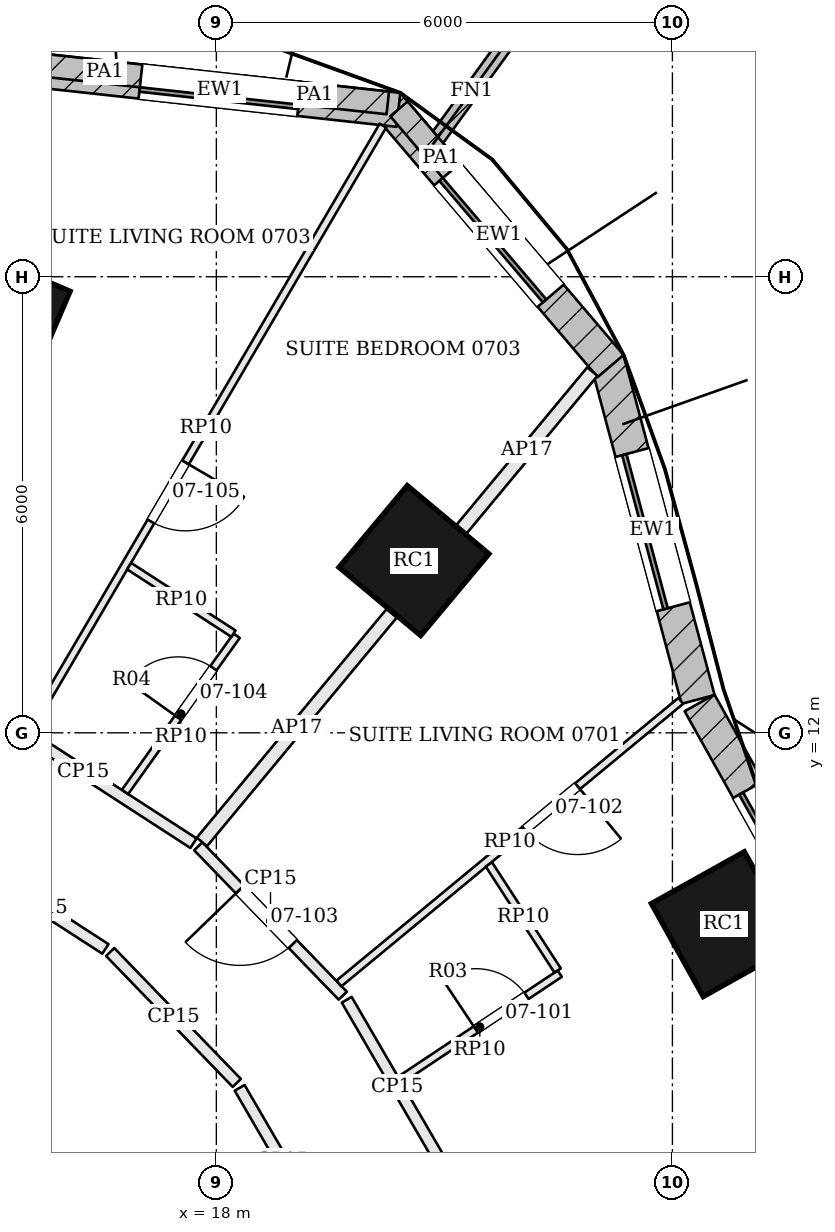
"""IFC4 building model, lengths in metres.
Left out: names, types, materials, properties, quantities, classifications, styles, units other than length and angle.
Written with IfcOpenShell. Run it as: python <this file> out.ifc"""

import sys

from ifc_helpers import new_model, si_unit, direction, frame, frame_2d, origin, origin_2d, place, context, subcontext, project, spatial, rectangle, extrude, element, fill, save


model = new_model("IFC4")
c1 = context("Model", 3, precision=1e-05, world=origin(), true_north=direction((0.0, 1.0)))
c2 = subcontext(c1, "Body", "Model", "MODEL_VIEW")
j1 = project(units=[si_unit("LENGTHUNIT", "METRE"), si_unit("PLANEANGLEUNIT", "RADIAN")], contexts=[c1])
p1 = place(None, origin())
s1 = spatial("IfcSite", under=j1, at=p1, CompositionType="ELEMENT")
p2 = place(p1, origin())
s2 = spatial("IfcBuilding", under=s1, at=p2, CompositionType="ELEMENT")
p3 = place(p2, frame((0.0, 0.0, 41.1)))
s3 = spatial("IfcBuildingStorey", under=s2, at=p3, CompositionType="ELEMENT", Elevation=41.1)
for number, where, z_axis, x_axis in (
    (1, (24.676, 9.483, 0.0), (0.0, 0.0, 1.0), (-0.487, 0.873, 0.0)),
    (2, (20.6, 14.266, 0.0), (0.0, 0.0, 1.0), (-0.767, 0.641, 0.0)),
    (3, (15.157, 17.441, 0.0), (0.0, 0.0, 1.0), (-0.919, 0.394, 0.0)),
):
    element("IfcColumn", number, at=place(p3, frame(where, z_axis=z_axis, x_axis=x_axis)), inside=s3, PredefinedType="COLUMN", context=c2, shape_type="SweptSolid", body=[
        extrude(rectangle(XDim=1.4, YDim=1.4, at=origin_2d()), origin(), (0.0, 0.0, 1.0), 3.6),
    ])
p4 = place(p3, frame((26.514, 8.541, 0.0), z_axis=(0.0, 0.0, 1.0), x_axis=(-0.488504028898, 0.87256163894, 0.0)))
e4 = element("IfcWall", 4, at=p4, inside=s3, PredefinedType="SOLIDWALL", context=c2, shape_type="SweptSolid", body=[
    extrude(rectangle(XDim=4.416, YDim=0.45, at=frame_2d((2.208, 0.0))), origin(), (0.0, 0.0, 1.0), 3.4),
])
p5 = place(p4, frame((1.308, 0.0, 0.9)))
e5 = element("IfcOpeningElement", 5, at=p5, cuts=e4, PredefinedType="OPENING", context=c2, shape_type="SweptSolid", body=[
    extrude(rectangle(XDim=1.8, YDim=2.0, at=frame_2d((0.9, 1.0))), frame((0.0, 0.235, 0.0), z_axis=(0.0, -1.0, 0.0), x_axis=(1.0, 0.0, 0.0)), (0.0, 0.0, 1.0), 0.47),
])
p6 = place(p3, frame((24.337, 12.439, 0.0), z_axis=(0.0, 0.0, 1.0), x_axis=(-0.258441377569, 0.966026942875, 0.0)))
e6 = element("IfcWall", 6, at=p6, inside=s3, PredefinedType="SOLIDWALL", context=c2, shape_type="SweptSolid", body=[
    extrude(rectangle(XDim=4.624, YDim=0.45, at=frame_2d((2.312, 0.0))), origin(), (0.0, 0.0, 1.0), 3.4),
])
p7 = place(p6, frame((1.262, 0.0, 0.9)))
e7 = element("IfcOpeningElement", 7, at=p7, cuts=e6, PredefinedType="OPENING", context=c2, shape_type="SweptSolid", body=[
    extrude(rectangle(XDim=2.1, YDim=2.0, at=frame_2d((1.05, 1.0))), frame((0.0, 0.235, 0.0), z_axis=(0.0, -1.0, 0.0), x_axis=(1.0, 0.0, 0.0)), (0.0, 0.0, 1.0), 0.47),
])
p8 = place(p3, frame((23.187, 16.825, 0.0), z_axis=(0.0, 0.0, 1.0), x_axis=(-0.648462985992, 0.761246186065, 0.0)))
e8 = element("IfcWall", 8, at=p8, inside=s3, PredefinedType="SOLIDWALL", context=c2, shape_type="SweptSolid", body=[
    extrude(rectangle(XDim=4.531, YDim=0.45, at=frame_2d((2.265, 0.0))), origin(), (0.0, 0.0, 1.0), 3.4),
])
p9 = place(p8, frame((1.215, 0.0, 0.9)))
e9 = element("IfcOpeningElement", 9, at=p9, cuts=e8, PredefinedType="OPENING", context=c2, shape_type="SweptSolid", body=[
    extrude(rectangle(XDim=2.1, YDim=2.0, at=frame_2d((1.05, 1.0))), frame((0.0, 0.235, 0.0), z_axis=(0.0, -1.0, 0.0), x_axis=(1.0, 0.0, 0.0)), (0.0, 0.0, 1.0), 0.47),
])
p10 = place(p3, frame((20.396, 20.196, 0.0), z_axis=(0.0, 0.0, 1.0), x_axis=(-0.994063142291, 0.108804729393, 0.0)))
e10 = element("IfcWall", 10, at=p10, inside=s3, PredefinedType="SOLIDWALL", context=c2, shape_type="SweptSolid", body=[
    extrude(rectangle(XDim=4.728, YDim=0.45, at=frame_2d((2.364, 0.0))), origin(), (0.0, 0.0, 1.0), 3.4),
])
p11 = place(p10, frame((1.314, 0.0, 0.9)))
e11 = element("IfcOpeningElement", 11, at=p11, cuts=e10, PredefinedType="OPENING", context=c2, shape_type="SweptSolid", body=[
    extrude(rectangle(XDim=2.1, YDim=2.0, at=frame_2d((1.05, 1.0))), frame((0.0, 0.235, 0.0), z_axis=(0.0, -1.0, 0.0), x_axis=(1.0, 0.0, 0.0)), (0.0, 0.0, 1.0), 0.47),
])
p12 = place(p3, frame((20.846, 19.739, 0.0), z_axis=(0.0, 0.0, 1.0), x_axis=(0.587607490034, 0.809146116382, 0.0)))
e12 = element("IfcWall", 12, at=p12, inside=s3, PredefinedType="SOLIDWALL", context=c2, shape_type="SweptSolid", body=[
    extrude(rectangle(XDim=1.75, YDim=0.2, at=frame_2d((0.875, 0.0))), origin(), (0.0, 0.0, 1.0), 3.4),
])
p13 = place(p3, frame((21.513, 18.906, 3.6), z_axis=(0.0, 0.0, 1.0), x_axis=(-0.648451151452, 0.761256267088, 0.0)))
e13 = element("IfcWall", 13, at=p13, inside=s3, PredefinedType="PARAPET", context=c2, shape_type="SweptSolid", body=[
    extrude(rectangle(XDim=1.712, YDim=0.3, at=frame_2d((0.856, 0.0))), origin(), (0.0, 0.0, 1.0), 1.1),
])
p14 = place(p3, frame((20.255, 20.287, 3.6), z_axis=(0.0, 0.0, 1.0), x_axis=(-0.994062724773, 0.108808543863, 0.0)))
e14 = element("IfcWall", 14, at=p14, inside=s3, PredefinedType="PARAPET", context=c2, shape_type="SweptSolid", body=[
    extrude(rectangle(XDim=1.932, YDim=0.3, at=frame_2d((0.966, 0.0))), origin(), (0.0, 0.0, 1.0), 1.1),
])
p15 = place(p3, frame((17.772, 20.559, 3.6), z_axis=(0.0, 0.0, 1.0), x_axis=(-0.994063072833, 0.108805363973, 0.0)))
e15 = element("IfcWall", 15, at=p15, inside=s3, PredefinedType="PARAPET", context=c2, shape_type="SweptSolid", body=[
    extrude(rectangle(XDim=2.489, YDim=0.3, at=frame_2d((1.244, 0.0))), origin(), (0.0, 0.0, 1.0), 1.1),
])
p16 = place(p3, frame((21.043, 6.202, 0.0), z_axis=(0.0, 0.0, 1.0), x_axis=(-0.502371650135, 0.864651794158, 0.0)))
e16 = element("IfcWall", 16, at=p16, inside=s3, PredefinedType="PARTITIONING", context=c2, shape_type="SweptSolid", body=[
    extrude(rectangle(XDim=2.644, YDim=0.15, at=frame_2d((1.322, 0.0))), origin(), (0.0, 0.0, 1.0), 2.68),
])
p17 = place(p3, frame((19.663, 8.542, 0.0), z_axis=(0.0, 0.0, 1.0), x_axis=(-0.695220577526, 0.718796458383, 0.0)))
e17 = element("IfcWall", 17, at=p17, inside=s3, PredefinedType="PARTITIONING", context=c2, shape_type="SweptSolid", body=[
    extrude(rectangle(XDim=2.734, YDim=0.15, at=frame_2d((1.367, 0.0))), origin(), (0.0, 0.0, 1.0), 2.68),
])
p18 = place(p17, frame((0.945, 0.0, 0.0)))
e18 = element("IfcOpeningElement", 18, at=p18, cuts=e17, PredefinedType="OPENING", context=c2, shape_type="SweptSolid", body=[
    extrude(rectangle(XDim=1.0, YDim=2.1, at=frame_2d((0.5, 1.05))), frame((0.0, 0.085, 0.0), z_axis=(0.0, -1.0, 0.0), x_axis=(1.0, 0.0, 0.0)), (0.0, 0.0, 1.0), 0.17),
])
p19 = place(p3, frame((22.947, 16.752, 0.0), z_axis=(0.0, 0.0, 1.0), x_axis=(-0.638756388383, -0.769409043552, 0.0)))
e19 = element("IfcWall", 19, at=p19, inside=s3, PredefinedType="PARTITIONING", context=c2, shape_type="SweptSolid", body=[
    extrude(rectangle(XDim=2.693, YDim=0.175, at=frame_2d((1.346, 0.0))), origin(), (0.0, 0.0, 1.0), 2.68),
])
p20 = place(p3, frame((20.307, 13.573, 0.0), z_axis=(0.0, 0.0, 1.0), x_axis=(-0.638751887509, -0.769412780114, 0.0)))
e20 = element("IfcWall", 20, at=p20, inside=s3, PredefinedType="PARTITIONING", context=c2, shape_type="SweptSolid", body=[
    extrude(rectangle(XDim=3.909, YDim=0.175, at=frame_2d((1.955, 0.0))), origin(), (0.0, 0.0, 1.0), 2.68),
])
p21 = place(p3, frame((17.699, 10.548, 0.0), z_axis=(0.0, 0.0, 1.0), x_axis=(-0.839188825453, 0.54384015596, 0.0)))
e21 = element("IfcWall", 21, at=p21, inside=s3, PredefinedType="PARTITIONING", context=c2, shape_type="SweptSolid", body=[
    extrude(rectangle(XDim=3.454, YDim=0.15, at=frame_2d((1.727, 0.0))), origin(), (0.0, 0.0, 1.0), 2.68),
])
p22 = place(p3, frame((16.604, 9.116, 0.0), z_axis=(0.0, 0.0, 1.0), x_axis=(0.695185405932, -0.718830474716, 0.0)))
e22 = element("IfcWall", 22, at=p22, inside=s3, PredefinedType="PARTITIONING", context=c2, shape_type="SweptSolid", body=[
    extrude(rectangle(XDim=2.396, YDim=0.15, at=frame_2d((1.198, 0.0))), origin(), (0.0, 0.0, 1.0), 2.68),
])
p23 = place(p3, frame((18.306, 7.329, 0.0), z_axis=(0.0, 0.0, 1.0), x_axis=(0.502425081691, -0.864620747662, 0.0)))
e23 = element("IfcWall", 23, at=p23, inside=s3, PredefinedType="PARTITIONING", context=c2, shape_type="SweptSolid", body=[
    extrude(rectangle(XDim=2.237, YDim=0.15, at=frame_2d((1.119, 0.0))), origin(), (0.0, 0.0, 1.0), 2.68),
])
p24 = place(p3, frame((14.863, 10.242, 0.0), z_axis=(0.0, 0.0, 1.0), x_axis=(0.839530811724, -0.543312079901, 0.0)))
e24 = element("IfcWall", 24, at=p24, inside=s3, PredefinedType="PARTITIONING", context=c2, shape_type="SweptSolid", body=[
    extrude(rectangle(XDim=1.998, YDim=0.15, at=frame_2d((0.999, 0.0))), origin(), (0.0, 0.0, 1.0), 2.68),
])
p25 = place(p3, frame((24.11, 12.42, 0.0), z_axis=(0.0, 0.0, 1.0), x_axis=(-0.770718759666, -0.637175480931, 0.0)))
e25 = element("IfcWall", 25, at=p25, inside=s3, PredefinedType="PARTITIONING", context=c2, shape_type="SweptSolid", body=[
    extrude(rectangle(XDim=5.835, YDim=0.1, at=frame_2d((2.918, 0.0))), origin(), (0.0, 0.0, 1.0), 2.68),
])
p26 = place(p25, frame((1.761, 0.0, 0.0)))
e26 = element("IfcOpeningElement", 26, at=p26, cuts=e25, PredefinedType="OPENING", context=c2, shape_type="SweptSolid", body=[
    extrude(rectangle(XDim=0.9, YDim=2.4, at=frame_2d((0.45, 1.2))), frame((0.0, 0.06, 0.0), z_axis=(0.0, -1.0, 0.0), x_axis=(1.0, 0.0, 0.0)), (0.0, 0.0, 1.0), 0.12),
])
p27 = place(p3, frame((20.415, 7.433, 0.0), z_axis=(0.0, 0.0, 1.0), x_axis=(0.832615138826, 0.553851993404, 0.0)))
e27 = element("IfcWall", 27, at=p27, inside=s3, PredefinedType="PARTITIONING", context=c2, shape_type="SweptSolid", body=[
    extrude(rectangle(XDim=2.525, YDim=0.1, at=frame_2d((1.262, 0.0))), origin(), (0.0, 0.0, 1.0), 2.68),
])
p28 = place(p27, frame((1.2, 0.0, 0.0)))
e28 = element("IfcOpeningElement", 28, at=p28, cuts=e27, PredefinedType="OPENING", context=c2, shape_type="SweptSolid", body=[
    extrude(rectangle(XDim=0.8, YDim=2.1, at=frame_2d((0.4, 1.05))), frame((0.0, 0.06, 0.0), z_axis=(0.0, -1.0, 0.0), x_axis=(1.0, 0.0, 0.0)), (0.0, 0.0, 1.0), 0.12),
])
p29 = place(p3, frame((22.49, 8.873, 0.0), z_axis=(0.0, 0.0, 1.0), x_axis=(-0.543847599443, 0.839184001623, 0.0)))
e29 = element("IfcWall", 29, at=p29, inside=s3, PredefinedType="PARTITIONING", context=c2, shape_type="SweptSolid", body=[
    extrude(rectangle(XDim=1.663, YDim=0.1, at=frame_2d((0.832, 0.0))), origin(), (0.0, 0.0, 1.0), 2.68),
])
p30 = place(p3, frame((20.191, 19.988, 0.0), z_axis=(0.0, 0.0, 1.0), x_axis=(-0.505620182585, -0.862756182802, 0.0)))
e30 = element("IfcWall", 30, at=p30, inside=s3, PredefinedType="PARTITIONING", context=c2, shape_type="SweptSolid", body=[
    extrude(rectangle(XDim=9.211, YDim=0.1, at=frame_2d((4.605, 0.0))), origin(), (0.0, 0.0, 1.0), 2.68),
])
p31 = place(p30, frame((5.136, 0.0, 0.0)))
e31 = element("IfcOpeningElement", 31, at=p31, cuts=e30, PredefinedType="OPENING", context=c2, shape_type="SweptSolid", body=[
    extrude(rectangle(XDim=0.9, YDim=2.4, at=frame_2d((0.45, 1.2))), frame((0.0, 0.06, 0.0), z_axis=(0.0, -1.0, 0.0), x_axis=(1.0, 0.0, 0.0)), (0.0, 0.0, 1.0), 0.12),
])
p32 = place(p3, frame((16.799, 11.223, 0.0), z_axis=(0.0, 0.0, 1.0), x_axis=(0.581494263037, 0.81355050369, 0.0)))
e32 = element("IfcWall", 32, at=p32, inside=s3, PredefinedType="PARTITIONING", context=c2, shape_type="SweptSolid", body=[
    extrude(rectangle(XDim=2.525, YDim=0.1, at=frame_2d((1.262, 0.0))), origin(), (0.0, 0.0, 1.0), 2.68),
])
p33 = place(p32, frame((1.2, 0.0, 0.0)))
e33 = element("IfcOpeningElement", 33, at=p33, cuts=e32, PredefinedType="OPENING", context=c2, shape_type="SweptSolid", body=[
    extrude(rectangle(XDim=0.8, YDim=2.1, at=frame_2d((0.4, 1.05))), frame((0.0, 0.06, 0.0), z_axis=(0.0, -1.0, 0.0), x_axis=(1.0, 0.0, 0.0)), (0.0, 0.0, 1.0), 0.12),
])
p34 = place(p3, frame((18.225, 13.304, 0.0), z_axis=(0.0, 0.0, 1.0), x_axis=(-0.839486017112, 0.543381290692, 0.0)))
e34 = element("IfcWall", 34, at=p34, inside=s3, PredefinedType="PARTITIONING", context=c2, shape_type="SweptSolid", body=[
    extrude(rectangle(XDim=1.635, YDim=0.1, at=frame_2d((0.817, 0.0))), origin(), (0.0, 0.0, 1.0), 2.68),
])
p35 = place(p5, origin())
e35 = element("IfcWindow", 35, at=p35, inside=s3, PartitioningType="SINGLE_PANEL", PredefinedType="WINDOW", context=c2, shape_type="SweptSolid", body=[
    extrude(rectangle(XDim=1.8, YDim=2.0, at=frame_2d((0.9, 1.0))), frame((0.0, 0.135, 0.0), z_axis=(0.0, -1.0, 0.0), x_axis=(1.0, 0.0, 0.0)), (0.0, 0.0, 1.0), 0.06),
])
fill(e5, e35)
p36 = place(p7, origin())
e36 = element("IfcWindow", 36, at=p36, inside=s3, PartitioningType="SINGLE_PANEL", PredefinedType="WINDOW", context=c2, shape_type="SweptSolid", body=[
    extrude(rectangle(XDim=2.1, YDim=2.0, at=frame_2d((1.05, 1.0))), frame((0.0, 0.135, 0.0), z_axis=(0.0, -1.0, 0.0), x_axis=(1.0, 0.0, 0.0)), (0.0, 0.0, 1.0), 0.06),
])
fill(e7, e36)
p37 = place(p9, origin())
e37 = element("IfcWindow", 37, at=p37, inside=s3, PartitioningType="SINGLE_PANEL", PredefinedType="WINDOW", context=c2, shape_type="SweptSolid", body=[
    extrude(rectangle(XDim=2.1, YDim=2.0, at=frame_2d((1.05, 1.0))), frame((0.0, 0.135, 0.0), z_axis=(0.0, -1.0, 0.0), x_axis=(1.0, 0.0, 0.0)), (0.0, 0.0, 1.0), 0.06),
])
fill(e9, e37)
p38 = place(p11, origin())
e38 = element("IfcWindow", 38, at=p38, inside=s3, PartitioningType="SINGLE_PANEL", PredefinedType="WINDOW", context=c2, shape_type="SweptSolid", body=[
    extrude(rectangle(XDim=2.1, YDim=2.0, at=frame_2d((1.05, 1.0))), frame((0.0, 0.135, 0.0), z_axis=(0.0, -1.0, 0.0), x_axis=(1.0, 0.0, 0.0)), (0.0, 0.0, 1.0), 0.06),
])
fill(e11, e38)
p39 = place(p28, origin())
e39 = element("IfcDoor", 39, at=p39, inside=s3, OperationType="SINGLE_SWING_LEFT", PredefinedType="DOOR", context=c2, shape_type="SweptSolid", body=[
    extrude(rectangle(XDim=0.8, YDim=2.1, at=frame_2d((0.4, 1.05))), frame((0.0, 0.025, 0.0), z_axis=(0.0, -1.0, 0.0), x_axis=(1.0, 0.0, 0.0)), (0.0, 0.0, 1.0), 0.05),
])
fill(e28, e39)
p40 = place(p26, origin())
e40 = element("IfcDoor", 40, at=p40, inside=s3, OperationType="SINGLE_SWING_LEFT", PredefinedType="DOOR", context=c2, shape_type="SweptSolid", body=[
    extrude(rectangle(XDim=0.9, YDim=2.4, at=frame_2d((0.45, 1.2))), frame((0.0, 0.025, 0.0), z_axis=(0.0, -1.0, 0.0), x_axis=(1.0, 0.0, 0.0)), (0.0, 0.0, 1.0), 0.05),
])
fill(e26, e40)
p41 = place(p18, origin())
e41 = element("IfcDoor", 41, at=p41, inside=s3, OperationType="SINGLE_SWING_RIGHT", PredefinedType="DOOR", context=c2, shape_type="SweptSolid", body=[
    extrude(rectangle(XDim=1.0, YDim=2.1, at=frame_2d((0.5, 1.05))), frame((0.0, 0.025, 0.0), z_axis=(0.0, -1.0, 0.0), x_axis=(1.0, 0.0, 0.0)), (0.0, 0.0, 1.0), 0.05),
])
fill(e18, e41)
p42 = place(p33, origin())
e42 = element("IfcDoor", 42, at=p42, inside=s3, OperationType="SINGLE_SWING_LEFT", PredefinedType="DOOR", context=c2, shape_type="SweptSolid", body=[
    extrude(rectangle(XDim=0.8, YDim=2.1, at=frame_2d((0.4, 1.05))), frame((0.0, 0.025, 0.0), z_axis=(0.0, -1.0, 0.0), x_axis=(1.0, 0.0, 0.0)), (0.0, 0.0, 1.0), 0.05),
])
fill(e33, e42)
p43 = place(p31, origin())
e43 = element("IfcDoor", 43, at=p43, inside=s3, OperationType="SINGLE_SWING_LEFT", PredefinedType="DOOR", context=c2, shape_type="SweptSolid", body=[
    extrude(rectangle(XDim=0.9, YDim=2.4, at=frame_2d((0.45, 1.2))), frame((0.0, 0.025, 0.0), z_axis=(0.0, -1.0, 0.0), x_axis=(1.0, 0.0, 0.0)), (0.0, 0.0, 1.0), 0.05),
])
fill(e31, e43)
save(model, sys.argv[1])
